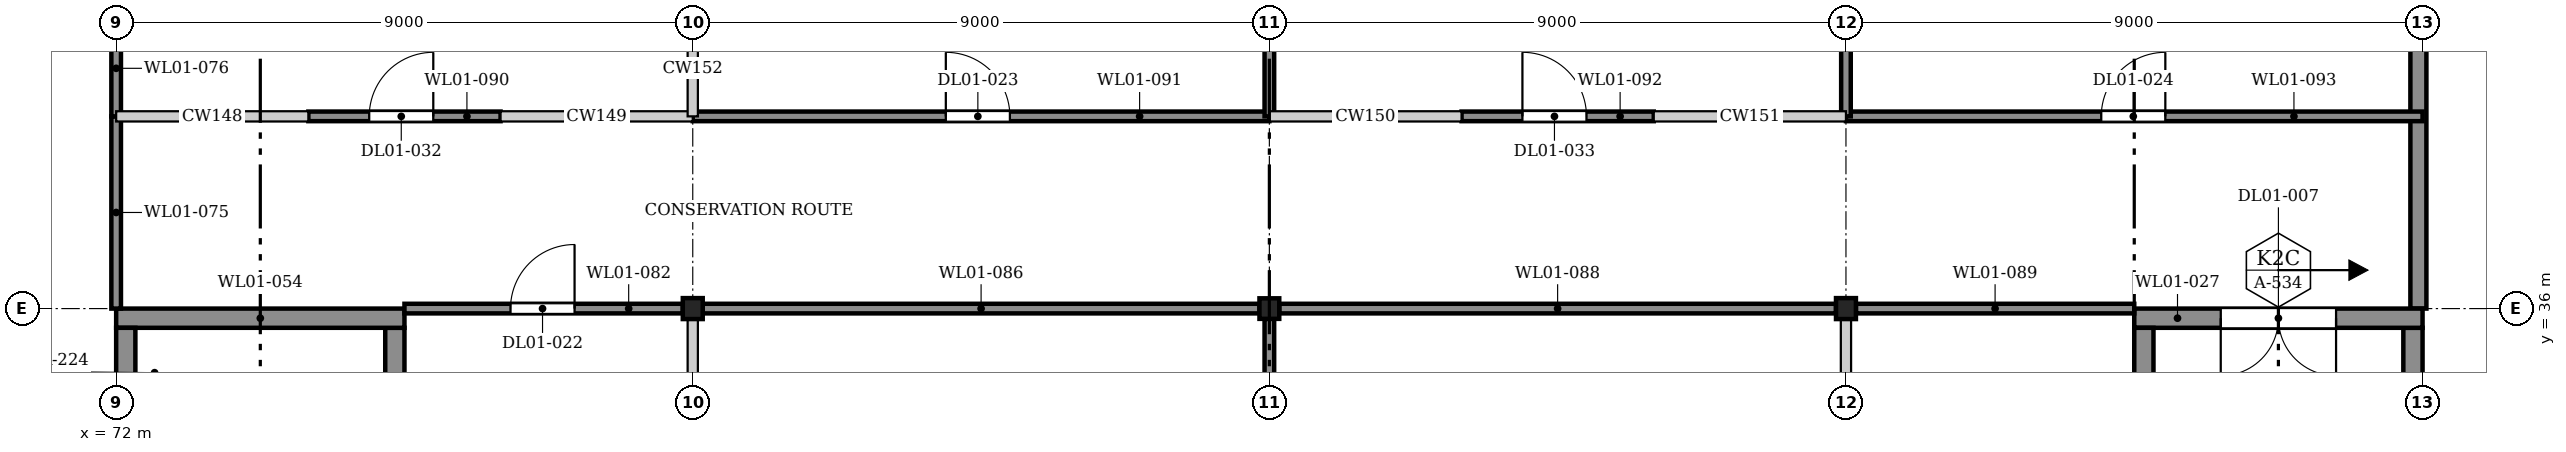
"""IFC4 building model, lengths in metres.
Left out: names, types, materials, properties, quantities, classifications, styles, units other than length and angle.
Written with IfcOpenShell. Run it as: python <this file> out.ifc"""

import sys

from ifc_helpers import new_model, si_unit, direction, frame, frame_2d, origin, origin_2d, place, context, subcontext, project, spatial, rectangle, i_section, extrude, element, fill, save


model = new_model("IFC4")
c1 = context("Model", 3, precision=1e-05, world=origin(), true_north=direction((0.0, 1.0)))
c2 = subcontext(c1, "Body", "Model", "MODEL_VIEW")
j1 = project(units=[si_unit("LENGTHUNIT", "METRE"), si_unit("PLANEANGLEUNIT", "RADIAN")], contexts=[c1])
p1 = place(None, origin())
s1 = spatial("IfcSite", under=j1, at=p1, CompositionType="ELEMENT")
p2 = place(p1, origin())
s2 = spatial("IfcBuilding", under=s1, at=p2, CompositionType="ELEMENT")
p3 = place(p2, frame((0.0, 0.0, 5.0)))
s3 = spatial("IfcBuildingStorey", under=s2, at=p3, CompositionType="ELEMENT", Elevation=5.0)
p4 = place(p3, frame((81.0, 36.0, 0.0), z_axis=(0.0, 0.0, 1.0), x_axis=(1.0, 0.0, 0.0)))
e1 = element("IfcColumn", 1, at=p4, inside=s3, PredefinedType="COLUMN", context=c2, shape_type="SweptSolid", body=[
    extrude(i_section(OverallWidth=0.311, OverallDepth=0.327, WebThickness=0.016, FlangeThickness=0.025, FilletRadius=0.017, at=origin_2d()), origin(), (0.0, 0.0, 1.0), 4.2),
])
p5 = place(p3, frame((90.0, 36.0, 0.0), z_axis=(0.0, 0.0, 1.0), x_axis=(1.0, 0.0, 0.0)))
e2 = element("IfcColumn", 2, at=p5, inside=s3, PredefinedType="COLUMN", context=c2, shape_type="SweptSolid", body=[
    extrude(i_section(OverallWidth=0.309, OverallDepth=0.321, WebThickness=0.014, FlangeThickness=0.022, FilletRadius=0.017, at=origin_2d()), origin(), (0.0, 0.0, 1.0), 4.2),
])
p6 = place(p3, frame((99.0, 36.0, 0.0), z_axis=(0.0, 0.0, 1.0), x_axis=(1.0, 0.0, 0.0)))
e3 = element("IfcColumn", 3, at=p6, inside=s3, PredefinedType="COLUMN", context=c2, shape_type="SweptSolid", body=[
    extrude(i_section(OverallWidth=0.311, OverallDepth=0.327, WebThickness=0.016, FlangeThickness=0.025, FilletRadius=0.017, at=origin_2d()), origin(), (0.0, 0.0, 1.0), 4.2),
])
p7 = place(p3, frame((107.935, 36.0, 0.0), z_axis=(0.0, 0.0, 1.0), x_axis=(0.0, 1.0, 0.0)))
e4 = element("IfcWall", 4, at=p7, inside=s3, PredefinedType="SOLIDWALL", context=c2, shape_type="SweptSolid", body=[
    extrude(rectangle(XDim=8.85, YDim=0.25, at=frame_2d((4.425, 0.0))), origin(), (0.0, 0.0, 1.0), 3.25),
])
p8 = place(p3, frame((107.85, 27.3, 0.0), z_axis=(0.0, 0.0, 1.0), x_axis=(0.0, 1.0, 0.0)))
e5 = element("IfcWall", 5, at=p8, inside=s3, PredefinedType="SOLIDWALL", context=c2, shape_type="SweptSolid", body=[
    extrude(rectangle(XDim=8.4, YDim=0.3, at=frame_2d((4.2, 0.0))), origin(), (0.0, 0.0, 1.0), 4.2),
])
p9 = place(p3, frame((103.5, 35.85, 0.0), z_axis=(0.0, 0.0, 1.0), x_axis=(1.0, 0.0, 0.0)))
e6 = element("IfcWall", 6, at=p9, inside=s3, PredefinedType="SOLIDWALL", context=c2, shape_type="SweptSolid", body=[
    extrude(rectangle(XDim=4.5, YDim=0.3, at=frame_2d((2.25, 0.0))), origin(), (0.0, 0.0, 1.0), 4.2),
])
p10 = place(p9, frame((1.35, 0.0, 0.0)))
e7 = element("IfcOpeningElement", 7, at=p10, cuts=e6, PredefinedType="OPENING", context=c2, shape_type="SweptSolid", body=[
    extrude(rectangle(XDim=1.8, YDim=2.1, at=frame_2d((0.9, 1.05))), frame((0.0, 0.16, 0.0), z_axis=(0.0, -1.0, 0.0), x_axis=(1.0, 0.0, 0.0)), (0.0, 0.0, 1.0), 0.32),
])
p11 = place(p3, frame((103.65, 27.3, 0.0), z_axis=(0.0, 0.0, 1.0), x_axis=(0.0, 1.0, 0.0)))
e8 = element("IfcWall", 8, at=p11, inside=s3, PredefinedType="SOLIDWALL", context=c2, shape_type="SweptSolid", body=[
    extrude(rectangle(XDim=8.4, YDim=0.3, at=frame_2d((4.2, 0.0))), origin(), (0.0, 0.0, 1.0), 4.2),
])
p12 = place(p3, frame((76.35, 27.3, 0.0), z_axis=(0.0, 0.0, 1.0), x_axis=(0.0, 1.0, 0.0)))
e9 = element("IfcWall", 9, at=p12, inside=s3, PredefinedType="SOLIDWALL", context=c2, shape_type="SweptSolid", body=[
    extrude(rectangle(XDim=8.4, YDim=0.3, at=frame_2d((4.2, 0.0))), origin(), (0.0, 0.0, 1.0), 4.2),
])
p13 = place(p12, frame((0.45, 0.0, 0.0)))
e10 = element("IfcOpeningElement", 10, at=p13, cuts=e9, PredefinedType="OPENING", context=c2, shape_type="SweptSolid", body=[
    extrude(rectangle(XDim=1.4, YDim=2.1, at=frame_2d((0.7, 1.05))), frame((0.0, 0.16, 0.0), z_axis=(0.0, -1.0, 0.0), x_axis=(1.0, 0.0, 0.0)), (0.0, 0.0, 1.0), 0.32),
])
p14 = place(p12, frame((4.925, 0.0, 0.0)))
e11 = element("IfcOpeningElement", 11, at=p14, cuts=e9, PredefinedType="OPENING", context=c2, shape_type="SweptSolid", body=[
    extrude(rectangle(XDim=1.0, YDim=2.1, at=frame_2d((0.5, 1.05))), frame((0.0, 0.16, 0.0), z_axis=(0.0, -1.0, 0.0), x_axis=(1.0, 0.0, 0.0)), (0.0, 0.0, 1.0), 0.32),
])
p15 = place(p3, frame((72.0, 35.85, 0.0), z_axis=(0.0, 0.0, 1.0), x_axis=(1.0, 0.0, 0.0)))
e12 = element("IfcWall", 12, at=p15, inside=s3, PredefinedType="SOLIDWALL", context=c2, shape_type="SweptSolid", body=[
    extrude(rectangle(XDim=4.5, YDim=0.3, at=frame_2d((2.25, 0.0))), origin(), (0.0, 0.0, 1.0), 4.2),
])
p16 = place(p3, frame((72.15, 27.3, 0.0), z_axis=(0.0, 0.0, 1.0), x_axis=(0.0, 1.0, 0.0)))
e13 = element("IfcWall", 13, at=p16, inside=s3, PredefinedType="SOLIDWALL", context=c2, shape_type="SweptSolid", body=[
    extrude(rectangle(XDim=8.4, YDim=0.3, at=frame_2d((4.2, 0.0))), origin(), (0.0, 0.0, 1.0), 4.2),
])
p17 = place(p16, frame((0.45, 0.0, 0.0)))
e14 = element("IfcOpeningElement", 14, at=p17, cuts=e13, PredefinedType="OPENING", context=c2, shape_type="SweptSolid", body=[
    extrude(rectangle(XDim=1.4, YDim=2.1, at=frame_2d((0.7, 1.05))), frame((0.0, 0.16, 0.0), z_axis=(0.0, -1.0, 0.0), x_axis=(1.0, 0.0, 0.0)), (0.0, 0.0, 1.0), 0.32),
])
p18 = place(p3, frame((72.0, 36.0, 0.0), z_axis=(0.0, 0.0, 1.0), x_axis=(0.0, 1.0, 0.0)))
e15 = element("IfcWall", 15, at=p18, inside=s3, PredefinedType="PARTITIONING", context=c2, shape_type="SweptSolid", body=[
    extrude(rectangle(XDim=3.0, YDim=0.15, at=frame_2d((1.5, 0.0))), origin(), (0.0, 0.0, 1.0), 3.158),
])
p19 = place(p3, frame((72.0, 39.0, 0.0), z_axis=(0.0, 0.0, 1.0), x_axis=(0.0, 1.0, 0.0)))
e16 = element("IfcWall", 16, at=p19, inside=s3, PredefinedType="PARTITIONING", context=c2, shape_type="SweptSolid", body=[
    extrude(rectangle(XDim=1.5, YDim=0.15, at=frame_2d((0.75, 0.0))), origin(), (0.0, 0.0, 1.0), 3.158),
])
p20 = place(p3, frame((76.5, 36.0, 0.0), z_axis=(0.0, 0.0, 1.0), x_axis=(1.0, 0.0, 0.0)))
e17 = element("IfcWall", 17, at=p20, inside=s3, PredefinedType="PARTITIONING", context=c2, shape_type="SweptSolid", body=[
    extrude(rectangle(XDim=4.344, YDim=0.15, at=frame_2d((2.172, 0.0))), origin(), (0.0, 0.0, 1.0), 3.158),
])
p21 = place(p20, frame((1.655, 0.0, 0.0)))
e18 = element("IfcOpeningElement", 18, at=p21, cuts=e17, PredefinedType="OPENING", context=c2, shape_type="SweptSolid", body=[
    extrude(rectangle(XDim=1.0, YDim=2.1, at=frame_2d((0.5, 1.05))), frame((0.0, 0.085, 0.0), z_axis=(0.0, -1.0, 0.0), x_axis=(1.0, 0.0, 0.0)), (0.0, 0.0, 1.0), 0.17),
])
p22 = place(p3, frame((90.0, 27.178, 0.0), z_axis=(0.0, 0.0, 1.0), x_axis=(0.0, 1.0, 0.0)))
e19 = element("IfcWall", 19, at=p22, inside=s3, PredefinedType="PARTITIONING", context=c2, shape_type="SweptSolid", body=[
    extrude(rectangle(XDim=8.662, YDim=0.15, at=frame_2d((4.331, 0.0))), origin(), (0.0, 0.0, 1.0), 3.502),
])
for number, where, z_axis, x_axis in (
    (20, (81.156, 36.0, 0.0), (0.0, 0.0, 1.0), (1.0, 0.0, 0.0)),
    (21, (90.155, 36.0, 0.0), (0.0, 0.0, 1.0), (1.0, 0.0, 0.0)),
):
    element("IfcWall", number, at=place(p3, frame(where, z_axis=z_axis, x_axis=x_axis)), inside=s3, PredefinedType="PARTITIONING", context=c2, shape_type="SweptSolid", body=[
        extrude(rectangle(XDim=8.69, YDim=0.15, at=frame_2d((4.345, 0.0))), origin(), (0.0, 0.0, 1.0), 3.158),
    ])
p23 = place(p3, frame((99.156, 36.0, 0.0), z_axis=(0.0, 0.0, 1.0), x_axis=(1.0, 0.0, 0.0)))
e22 = element("IfcWall", 22, at=p23, inside=s3, PredefinedType="PARTITIONING", context=c2, shape_type="SweptSolid", body=[
    extrude(rectangle(XDim=4.344, YDim=0.15, at=frame_2d((2.172, 0.0))), origin(), (0.0, 0.0, 1.0), 3.158),
])
p24 = place(p3, frame((75.0, 39.0, 0.0), z_axis=(0.0, 0.0, 1.0), x_axis=(1.0, 0.0, 0.0)))
e23 = element("IfcWall", 23, at=p24, inside=s3, PredefinedType="PARTITIONING", context=c2, shape_type="SweptSolid", body=[
    extrude(rectangle(XDim=3.0, YDim=0.15, at=frame_2d((1.5, 0.0))), origin(), (0.0, 0.0, 1.0), 3.158),
])
p25 = place(p24, frame((0.95, 0.0, 0.0)))
e24 = element("IfcOpeningElement", 24, at=p25, cuts=e23, PredefinedType="OPENING", context=c2, shape_type="SweptSolid", body=[
    extrude(rectangle(XDim=1.0, YDim=2.1, at=frame_2d((0.5, 1.05))), frame((0.0, 0.085, 0.0), z_axis=(0.0, -1.0, 0.0), x_axis=(1.0, 0.0, 0.0)), (0.0, 0.0, 1.0), 0.17),
])
p26 = place(p3, frame((81.0, 39.0, 0.0), z_axis=(0.0, 0.0, 1.0), x_axis=(1.0, 0.0, 0.0)))
e25 = element("IfcWall", 25, at=p26, inside=s3, PredefinedType="PARTITIONING", context=c2, shape_type="SweptSolid", body=[
    extrude(rectangle(XDim=9.0, YDim=0.15, at=frame_2d((4.5, 0.0))), origin(), (0.0, 0.0, 1.0), 3.158),
])
p27 = place(p26, frame((3.95, 0.0, 0.0)))
e26 = element("IfcOpeningElement", 26, at=p27, cuts=e25, PredefinedType="OPENING", context=c2, shape_type="SweptSolid", body=[
    extrude(rectangle(XDim=1.0, YDim=2.1, at=frame_2d((0.5, 1.05))), frame((0.0, 0.085, 0.0), z_axis=(0.0, -1.0, 0.0), x_axis=(1.0, 0.0, 0.0)), (0.0, 0.0, 1.0), 0.17),
])
p28 = place(p3, frame((93.0, 39.0, 0.0), z_axis=(0.0, 0.0, 1.0), x_axis=(1.0, 0.0, 0.0)))
e27 = element("IfcWall", 27, at=p28, inside=s3, PredefinedType="PARTITIONING", context=c2, shape_type="SweptSolid", body=[
    extrude(rectangle(XDim=3.0, YDim=0.15, at=frame_2d((1.5, 0.0))), origin(), (0.0, 0.0, 1.0), 3.158),
])
p29 = place(p28, frame((0.95, 0.0, 0.0)))
e28 = element("IfcOpeningElement", 28, at=p29, cuts=e27, PredefinedType="OPENING", context=c2, shape_type="SweptSolid", body=[
    extrude(rectangle(XDim=1.0, YDim=2.1, at=frame_2d((0.5, 1.05))), frame((0.0, 0.085, 0.0), z_axis=(0.0, -1.0, 0.0), x_axis=(1.0, 0.0, 0.0)), (0.0, 0.0, 1.0), 0.17),
])
p30 = place(p3, frame((99.0, 39.0, 0.0), z_axis=(0.0, 0.0, 1.0), x_axis=(1.0, 0.0, 0.0)))
e29 = element("IfcWall", 29, at=p30, inside=s3, PredefinedType="PARTITIONING", context=c2, shape_type="SweptSolid", body=[
    extrude(rectangle(XDim=9.0, YDim=0.15, at=frame_2d((4.5, 0.0))), origin(), (0.0, 0.0, 1.0), 3.158),
])
p31 = place(p30, frame((3.985, 0.0, 0.0)))
e30 = element("IfcOpeningElement", 30, at=p31, cuts=e29, PredefinedType="OPENING", context=c2, shape_type="SweptSolid", body=[
    extrude(rectangle(XDim=1.0, YDim=2.1, at=frame_2d((0.5, 1.05))), frame((0.0, 0.085, 0.0), z_axis=(0.0, -1.0, 0.0), x_axis=(1.0, 0.0, 0.0)), (0.0, 0.0, 1.0), 0.17),
])
for number, where, z_axis, x_axis in (
    (31, (90.0, 39.0, 0.0), (0.0, 0.0, 1.0), (0.0, 1.0, 0.0)),
    (32, (99.0, 39.0, 0.0), (0.0, 0.0, 1.0), (0.0, 1.0, 0.0)),
):
    element("IfcWall", number, at=place(p3, frame(where, z_axis=z_axis, x_axis=x_axis)), inside=s3, PredefinedType="PARTITIONING", context=c2, shape_type="SweptSolid", body=[
        extrude(rectangle(XDim=5.846, YDim=0.15, at=frame_2d((2.923, 0.0))), origin(), (0.0, 0.0, 1.0), 3.158),
    ])
p32 = place(p10, frame((1.8, 0.0, 0.0), z_axis=(0.0, 0.0, 1.0), x_axis=(-1.0, 0.0, 0.0)))
e33 = element("IfcDoor", 33, at=p32, inside=s3, OperationType="DOUBLE_DOOR_SINGLE_SWING", PredefinedType="DOOR", context=c2, shape_type="SweptSolid", body=[
    extrude(rectangle(XDim=1.8, YDim=2.1, at=frame_2d((0.9, 1.05))), frame((0.0, 0.025, 0.0), z_axis=(0.0, -1.0, 0.0), x_axis=(1.0, 0.0, 0.0)), (0.0, 0.0, 1.0), 0.05),
])
fill(e7, e33)
p33 = place(p21, origin())
e34 = element("IfcDoor", 34, at=p33, inside=s3, OperationType="SINGLE_SWING_LEFT", PredefinedType="DOOR", context=c2, shape_type="SweptSolid", body=[
    extrude(rectangle(XDim=1.0, YDim=2.1, at=frame_2d((0.5, 1.05))), frame((0.0, 0.025, 0.0), z_axis=(0.0, -1.0, 0.0), x_axis=(1.0, 0.0, 0.0)), (0.0, 0.0, 1.0), 0.05),
])
fill(e18, e34)
p34 = place(p27, origin())
e35 = element("IfcDoor", 35, at=p34, inside=s3, OperationType="SINGLE_SWING_RIGHT", PredefinedType="DOOR", context=c2, shape_type="SweptSolid", body=[
    extrude(rectangle(XDim=1.0, YDim=2.1, at=frame_2d((0.5, 1.05))), frame((0.0, 0.025, 0.0), z_axis=(0.0, -1.0, 0.0), x_axis=(1.0, 0.0, 0.0)), (0.0, 0.0, 1.0), 0.05),
])
fill(e26, e35)
p35 = place(p31, origin())
e36 = element("IfcDoor", 36, at=p35, inside=s3, OperationType="SINGLE_SWING_LEFT", PredefinedType="DOOR", context=c2, shape_type="SweptSolid", body=[
    extrude(rectangle(XDim=1.0, YDim=2.1, at=frame_2d((0.5, 1.05))), frame((0.0, 0.025, 0.0), z_axis=(0.0, -1.0, 0.0), x_axis=(1.0, 0.0, 0.0)), (0.0, 0.0, 1.0), 0.05),
])
fill(e30, e36)
p36 = place(p25, origin())
e37 = element("IfcDoor", 37, at=p36, inside=s3, OperationType="SINGLE_SWING_LEFT", PredefinedType="DOOR", context=c2, shape_type="SweptSolid", body=[
    extrude(rectangle(XDim=1.0, YDim=2.1, at=frame_2d((0.5, 1.05))), frame((0.0, 0.025, 0.0), z_axis=(0.0, -1.0, 0.0), x_axis=(1.0, 0.0, 0.0)), (0.0, 0.0, 1.0), 0.05),
])
fill(e24, e37)
p37 = place(p29, origin())
e38 = element("IfcDoor", 38, at=p37, inside=s3, OperationType="SINGLE_SWING_RIGHT", PredefinedType="DOOR", context=c2, shape_type="SweptSolid", body=[
    extrude(rectangle(XDim=1.0, YDim=2.1, at=frame_2d((0.5, 1.05))), frame((0.0, 0.025, 0.0), z_axis=(0.0, -1.0, 0.0), x_axis=(1.0, 0.0, 0.0)), (0.0, 0.0, 1.0), 0.05),
])
fill(e28, e38)
save(model, sys.argv[1])
